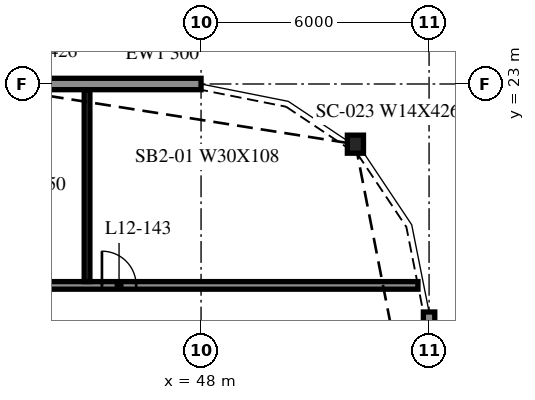
"""IFC4 building model, lengths in metres.
Left out: names, types, materials, properties, quantities, classifications, styles, units other than length and angle.
Written with IfcOpenShell. Run it as: python <this file> out.ifc"""

import sys

from ifc_helpers import new_model, si_unit, direction, frame, frame_2d, origin, origin_2d, place, context, subcontext, project, spatial, rectangle, i_section, extrude, element, fill, save


model = new_model("IFC4")
c1 = context("Model", 3, precision=1e-05, world=origin(), true_north=direction((0.0, 1.0)))
c2 = subcontext(c1, "Body", "Model", "MODEL_VIEW")
j1 = project(units=[si_unit("LENGTHUNIT", "METRE"), si_unit("PLANEANGLEUNIT", "RADIAN")], contexts=[c1])
p1 = place(None, origin())
s1 = spatial("IfcSite", under=j1, at=p1, CompositionType="ELEMENT")
p2 = place(p1, origin())
s2 = spatial("IfcBuilding", under=s1, at=p2, CompositionType="ELEMENT")
p3 = place(p2, frame((0.0, 0.0, 54.6)))
s3 = spatial("IfcBuildingStorey", under=s2, at=p3, CompositionType="ELEMENT", Elevation=54.6)
p4 = place(p3, frame((52.062, 21.416, -0.34), z_axis=(0.0, 0.0, 1.0), x_axis=(1.0, 0.0, 0.0)))
e1 = element("IfcColumn", 1, at=p4, inside=s3, PredefinedType="COLUMN", context=c2, shape_type="SweptSolid", body=[
    extrude(i_section(OverallWidth=0.424, OverallDepth=0.475, WebThickness=0.048, FlangeThickness=0.077, at=origin_2d()), origin(), (0.0, 0.0, 1.0), 4.3),
])
p5 = place(p3, frame((48.0, 23.0, 0.0), z_axis=(0.0, 0.0, 1.0), x_axis=(-1.0, 0.0, 0.0)))
e2 = element("IfcWall", 2, at=p5, inside=s3, PredefinedType="NOTDEFINED", context=c2, shape_type="SweptSolid", body=[
    extrude(rectangle(XDim=5.976, YDim=0.3, at=frame_2d((2.988, 0.0))), origin(), (0.0, 0.0, 1.0), 3.203),
])
p6 = place(p3, frame((54.0, 11.738, 0.0), z_axis=(0.0, 0.0, 1.0), x_axis=(0.0, 1.0, 0.0)))
e3 = element("IfcWall", 3, at=p6, inside=s3, PredefinedType="NOTDEFINED", context=c2, shape_type="SweptSolid", body=[
    extrude(rectangle(XDim=5.262, YDim=0.3, at=frame_2d((2.631, 0.0))), origin(), (0.0, 0.0, 1.0), 3.203),
])
p7 = place(p3, frame((-41.708, 17.7, 0.0), z_axis=(0.0, 0.0, 1.0), x_axis=(1.0, 0.0, 0.0)))
e4 = element("IfcWall", 4, at=p7, inside=s3, PredefinedType="PARTITIONING", context=c2, shape_type="SweptSolid", body=[
    extrude(rectangle(XDim=95.416, YDim=0.2, at=frame_2d((47.708, 0.0))), origin(), (0.0, 0.0, 1.0), 3.96),
])
p8 = place(p7, frame((7.5, 0.0, 0.0)))
e5 = element("IfcOpeningElement", 5, at=p8, cuts=e4, PredefinedType="OPENING", context=c2, shape_type="SweptSolid", body=[
    extrude(rectangle(XDim=0.9, YDim=2.1, at=frame_2d((0.45, 1.05))), frame((0.0, 0.11, 0.0), z_axis=(0.0, -1.0, 0.0), x_axis=(1.0, 0.0, 0.0)), (0.0, 0.0, 1.0), 0.22),
])
p9 = place(p7, frame((13.5, 0.0, 0.0)))
e6 = element("IfcOpeningElement", 6, at=p9, cuts=e4, PredefinedType="OPENING", context=c2, shape_type="SweptSolid", body=[
    extrude(rectangle(XDim=0.9, YDim=2.1, at=frame_2d((0.45, 1.05))), frame((0.0, 0.11, 0.0), z_axis=(0.0, -1.0, 0.0), x_axis=(1.0, 0.0, 0.0)), (0.0, 0.0, 1.0), 0.22),
])
p10 = place(p7, frame((19.5, 0.0, 0.0)))
e7 = element("IfcOpeningElement", 7, at=p10, cuts=e4, PredefinedType="OPENING", context=c2, shape_type="SweptSolid", body=[
    extrude(rectangle(XDim=0.9, YDim=2.1, at=frame_2d((0.45, 1.05))), frame((0.0, 0.11, 0.0), z_axis=(0.0, -1.0, 0.0), x_axis=(1.0, 0.0, 0.0)), (0.0, 0.0, 1.0), 0.22),
])
p11 = place(p7, frame((31.5, 0.0, 0.0)))
e8 = element("IfcOpeningElement", 8, at=p11, cuts=e4, PredefinedType="OPENING", context=c2, shape_type="SweptSolid", body=[
    extrude(rectangle(XDim=0.9, YDim=2.1, at=frame_2d((0.45, 1.05))), frame((0.0, 0.11, 0.0), z_axis=(0.0, -1.0, 0.0), x_axis=(1.0, 0.0, 0.0)), (0.0, 0.0, 1.0), 0.22),
])
p12 = place(p7, frame((34.5, 0.0, 0.0)))
e9 = element("IfcOpeningElement", 9, at=p12, cuts=e4, PredefinedType="OPENING", context=c2, shape_type="SweptSolid", body=[
    extrude(rectangle(XDim=0.9, YDim=2.1, at=frame_2d((0.45, 1.05))), frame((0.0, 0.11, 0.0), z_axis=(0.0, -1.0, 0.0), x_axis=(1.0, 0.0, 0.0)), (0.0, 0.0, 1.0), 0.22),
])
p13 = place(p7, frame((43.5, 0.0, 0.0)))
e10 = element("IfcOpeningElement", 10, at=p13, cuts=e4, PredefinedType="OPENING", context=c2, shape_type="SweptSolid", body=[
    extrude(rectangle(XDim=0.9, YDim=2.1, at=frame_2d((0.45, 1.05))), frame((0.0, 0.11, 0.0), z_axis=(0.0, -1.0, 0.0), x_axis=(1.0, 0.0, 0.0)), (0.0, 0.0, 1.0), 0.22),
])
p14 = place(p7, frame((47.3, 0.0, 0.0)))
e11 = element("IfcOpeningElement", 11, at=p14, cuts=e4, PredefinedType="OPENING", context=c2, shape_type="SweptSolid", body=[
    extrude(rectangle(XDim=0.9, YDim=2.1, at=frame_2d((0.45, 1.05))), frame((0.0, 0.11, 0.0), z_axis=(0.0, -1.0, 0.0), x_axis=(1.0, 0.0, 0.0)), (0.0, 0.0, 1.0), 0.22),
])
p15 = place(p7, frame((51.1, 0.0, 0.0)))
e12 = element("IfcOpeningElement", 12, at=p15, cuts=e4, PredefinedType="OPENING", context=c2, shape_type="SweptSolid", body=[
    extrude(rectangle(XDim=0.9, YDim=2.1, at=frame_2d((0.45, 1.05))), frame((0.0, 0.11, 0.0), z_axis=(0.0, -1.0, 0.0), x_axis=(1.0, 0.0, 0.0)), (0.0, 0.0, 1.0), 0.22),
])
p16 = place(p7, frame((57.1, 0.0, 0.0)))
e13 = element("IfcOpeningElement", 13, at=p16, cuts=e4, PredefinedType="OPENING", context=c2, shape_type="SweptSolid", body=[
    extrude(rectangle(XDim=0.9, YDim=2.1, at=frame_2d((0.45, 1.05))), frame((0.0, 0.11, 0.0), z_axis=(0.0, -1.0, 0.0), x_axis=(1.0, 0.0, 0.0)), (0.0, 0.0, 1.0), 0.22),
])
p17 = place(p7, frame((69.1, 0.0, 0.0)))
e14 = element("IfcOpeningElement", 14, at=p17, cuts=e4, PredefinedType="OPENING", context=c2, shape_type="SweptSolid", body=[
    extrude(rectangle(XDim=0.9, YDim=2.1, at=frame_2d((0.45, 1.05))), frame((0.0, 0.11, 0.0), z_axis=(0.0, -1.0, 0.0), x_axis=(1.0, 0.0, 0.0)), (0.0, 0.0, 1.0), 0.22),
])
p18 = place(p7, frame((72.1, 0.0, 0.0)))
e15 = element("IfcOpeningElement", 15, at=p18, cuts=e4, PredefinedType="OPENING", context=c2, shape_type="SweptSolid", body=[
    extrude(rectangle(XDim=0.9, YDim=2.1, at=frame_2d((0.45, 1.05))), frame((0.0, 0.11, 0.0), z_axis=(0.0, -1.0, 0.0), x_axis=(1.0, 0.0, 0.0)), (0.0, 0.0, 1.0), 0.22),
])
p19 = place(p7, frame((81.1, 0.0, 0.0)))
e16 = element("IfcOpeningElement", 16, at=p19, cuts=e4, PredefinedType="OPENING", context=c2, shape_type="SweptSolid", body=[
    extrude(rectangle(XDim=0.9, YDim=2.1, at=frame_2d((0.45, 1.05))), frame((0.0, 0.11, 0.0), z_axis=(0.0, -1.0, 0.0), x_axis=(1.0, 0.0, 0.0)), (0.0, 0.0, 1.0), 0.22),
])
p20 = place(p7, frame((87.1, 0.0, 0.0)))
e17 = element("IfcOpeningElement", 17, at=p20, cuts=e4, PredefinedType="OPENING", context=c2, shape_type="SweptSolid", body=[
    extrude(rectangle(XDim=0.9, YDim=2.1, at=frame_2d((0.45, 1.05))), frame((0.0, 0.11, 0.0), z_axis=(0.0, -1.0, 0.0), x_axis=(1.0, 0.0, 0.0)), (0.0, 0.0, 1.0), 0.22),
])
p21 = place(p3, frame((45.0, 17.8, 0.0), z_axis=(0.0, 0.0, 1.0), x_axis=(0.0, 1.0, 0.0)))
e18 = element("IfcWall", 18, at=p21, inside=s3, PredefinedType="PARTITIONING", context=c2, shape_type="SweptSolid", body=[
    extrude(rectangle(XDim=5.05, YDim=0.15, at=frame_2d((2.525, 0.0))), origin(), (0.0, 0.0, 1.0), 3.96),
])
p22 = place(p20, origin())
e19 = element("IfcDoor", 19, at=p22, inside=s3, OperationType="SINGLE_SWING_RIGHT", PredefinedType="DOOR", context=c2, shape_type="SweptSolid", body=[
    extrude(rectangle(XDim=0.9, YDim=2.1, at=frame_2d((0.45, 1.05))), frame((0.0, 0.025, 0.0), z_axis=(0.0, -1.0, 0.0), x_axis=(1.0, 0.0, 0.0)), (0.0, 0.0, 1.0), 0.05),
])
fill(e17, e19)
save(model, sys.argv[1])
